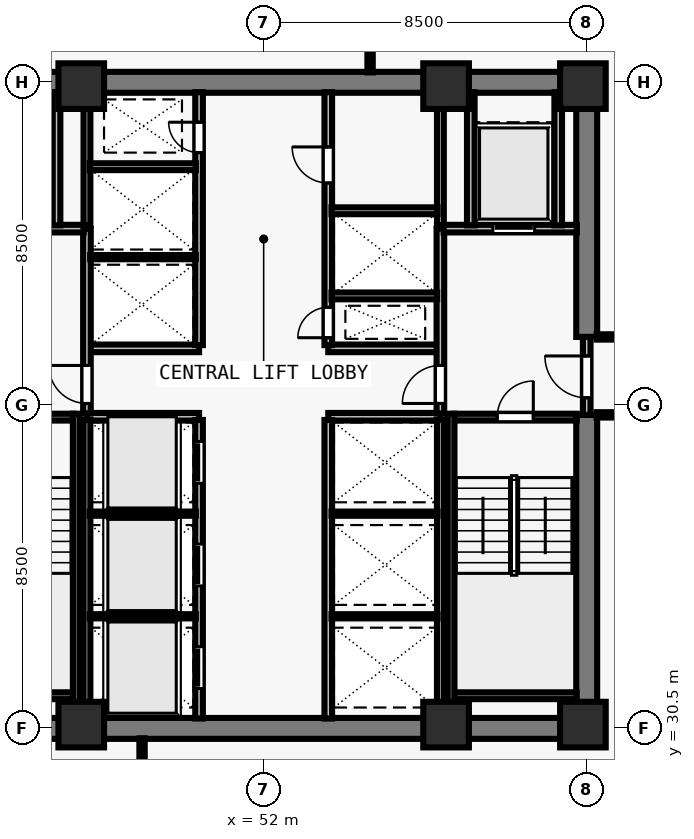
"""IFC4 building model, lengths in metres.
Left out: names, types, materials, properties, quantities, classifications, styles, units other than length and angle.
Written with IfcOpenShell. Run it as: python <this file> out.ifc"""

import sys

from ifc_helpers import new_model, si_unit, direction, frame, frame_2d, origin, origin_2d, place, context, subcontext, project, spatial, rectangle, extrude, element, fill, save


model = new_model("IFC4")
c1 = context("Model", 3, precision=1e-05, world=origin(), true_north=direction((0.0, 1.0)))
c2 = subcontext(c1, "Body", "Model", "MODEL_VIEW")
j1 = project(units=[si_unit("LENGTHUNIT", "METRE"), si_unit("PLANEANGLEUNIT", "RADIAN")], contexts=[c1])
p1 = place(None, origin())
s1 = spatial("IfcSite", under=j1, at=p1, CompositionType="ELEMENT")
p2 = place(p1, origin())
s2 = spatial("IfcBuilding", under=s1, at=p2, CompositionType="ELEMENT")
p3 = place(p2, frame((0.0, 0.0, 62.0)))
s3 = spatial("IfcBuildingStorey", under=s2, at=p3, CompositionType="ELEMENT", Elevation=62.0)
for number, where, z_axis, x_axis in (
    (1, (47.2, 30.6, 0.0), (0.0, 0.0, 1.0), (1.0, 0.0, 0.0)),
    (2, (56.8, 30.6, 0.0), (0.0, 0.0, 1.0), (1.0, 0.0, 0.0)),
    (3, (60.4, 30.6, 0.0), (0.0, 0.0, 1.0), (1.0, 0.0, 0.0)),
    (4, (47.2, 47.4, 0.0), (0.0, 0.0, 1.0), (1.0, 0.0, 0.0)),
    (5, (56.8, 47.4, 0.0), (0.0, 0.0, 1.0), (1.0, 0.0, 0.0)),
    (6, (60.4, 47.4, 0.0), (0.0, 0.0, 1.0), (1.0, 0.0, 0.0)),
):
    element("IfcColumn", number, at=place(p3, frame(where, z_axis=z_axis, x_axis=x_axis)), inside=s3, PredefinedType="COLUMN", context=c2, shape_type="SweptSolid", body=[
        extrude(rectangle(XDim=1.2, YDim=1.2, at=origin_2d()), origin(), (0.0, 0.0, 1.0), 3.5),
    ])
for number, where, z_axis, x_axis in (
    (7, (43.225, 30.5, 0.0), (0.0, 0.0, 1.0), (1.0, 0.0, 0.0)),
    (8, (43.225, 47.5, 0.0), (0.0, 0.0, 1.0), (1.0, 0.0, 0.0)),
):
    element("IfcWall", number, at=place(p3, frame(where, z_axis=z_axis, x_axis=x_axis)), inside=s3, PredefinedType="SHEAR", context=c2, shape_type="SweptSolid", body=[
        extrude(rectangle(XDim=17.55, YDim=0.55, at=frame_2d((8.775, 0.0))), origin(), (0.0, 0.0, 1.0), 3.28),
    ])
p4 = place(p3, frame((60.5, 30.765, 0.0), z_axis=(0.0, 0.0, 1.0), x_axis=(0.0, 1.0, 0.0)))
e9 = element("IfcWall", 9, at=p4, inside=s3, PredefinedType="SHEAR", context=c2, shape_type="SweptSolid", body=[
    extrude(rectangle(XDim=7.985, YDim=0.55, at=frame_2d((3.993, 0.0))), origin(), (0.0, 0.0, 1.0), 3.28),
])
p5 = place(p3, frame((60.5, 40.8, 0.0), z_axis=(0.0, 0.0, 1.0), x_axis=(0.0, 1.0, 0.0)))
e10 = element("IfcWall", 10, at=p5, inside=s3, PredefinedType="SHEAR", context=c2, shape_type="SweptSolid", body=[
    extrude(rectangle(XDim=6.435, YDim=0.55, at=frame_2d((3.218, 0.0))), origin(), (0.0, 0.0, 1.0), 3.28),
])
for number, where, z_axis, x_axis in (
    (11, (47.35, 38.7, 0.0), (0.0, 0.0, 1.0), (1.0, 0.0, 0.0)),
    (12, (47.35, 40.5, 0.0), (0.0, 0.0, 1.0), (1.0, 0.0, 0.0)),
    (13, (53.7, 38.7, 0.0), (0.0, 0.0, 1.0), (1.0, 0.0, 0.0)),
    (14, (53.7, 40.5, 0.0), (0.0, 0.0, 1.0), (1.0, 0.0, 0.0)),
):
    element("IfcWall", number, at=place(p3, frame(where, z_axis=z_axis, x_axis=x_axis)), inside=s3, PredefinedType="SOLIDWALL", context=c2, shape_type="SweptSolid", body=[
        extrude(rectangle(XDim=2.95, YDim=0.2, at=frame_2d((1.475, 0.0))), origin(), (0.0, 0.0, 1.0), 3.28),
    ])
p6 = place(p3, frame((50.3, 30.76, 0.0), z_axis=(0.0, 0.0, 1.0), x_axis=(0.0, 1.0, 0.0)))
e15 = element("IfcWall", 15, at=p6, inside=s3, PredefinedType="SOLIDWALL", context=c2, shape_type="SweptSolid", body=[
    extrude(rectangle(XDim=7.855, YDim=0.2, at=frame_2d((3.927, 0.0))), origin(), (0.0, 0.0, 1.0), 3.28),
])
p7 = place(p6, frame((0.79, 0.0, 0.0)))
e16 = element("IfcOpeningElement", 16, at=p7, cuts=e15, PredefinedType="OPENING", context=c2, shape_type="SweptSolid", body=[
    extrude(rectangle(XDim=1.1, YDim=2.2, at=frame_2d((0.55, 1.1))), frame((0.0, 0.11, 0.0), z_axis=(0.0, -1.0, 0.0), x_axis=(1.0, 0.0, 0.0)), (0.0, 0.0, 1.0), 0.22),
])
p8 = place(p6, frame((3.49, 0.0, 0.0)))
e17 = element("IfcOpeningElement", 17, at=p8, cuts=e15, PredefinedType="OPENING", context=c2, shape_type="SweptSolid", body=[
    extrude(rectangle(XDim=1.1, YDim=2.2, at=frame_2d((0.55, 1.1))), frame((0.0, 0.11, 0.0), z_axis=(0.0, -1.0, 0.0), x_axis=(1.0, 0.0, 0.0)), (0.0, 0.0, 1.0), 0.22),
])
p9 = place(p6, frame((6.19, 0.0, 0.0)))
e18 = element("IfcOpeningElement", 18, at=p9, cuts=e15, PredefinedType="OPENING", context=c2, shape_type="SweptSolid", body=[
    extrude(rectangle(XDim=1.1, YDim=2.2, at=frame_2d((0.55, 1.1))), frame((0.0, 0.11, 0.0), z_axis=(0.0, -1.0, 0.0), x_axis=(1.0, 0.0, 0.0)), (0.0, 0.0, 1.0), 0.22),
])
p10 = place(p3, frame((53.7, 30.76, 0.0), z_axis=(0.0, 0.0, 1.0), x_axis=(0.0, 1.0, 0.0)))
e19 = element("IfcWall", 19, at=p10, inside=s3, PredefinedType="SOLIDWALL", context=c2, shape_type="SweptSolid", body=[
    extrude(rectangle(XDim=7.855, YDim=0.2, at=frame_2d((3.927, 0.0))), origin(), (0.0, 0.0, 1.0), 3.28),
])
p11 = place(p3, frame((50.3, 40.585, 0.0), z_axis=(0.0, 0.0, 1.0), x_axis=(0.0, 1.0, 0.0)))
e20 = element("IfcWall", 20, at=p11, inside=s3, PredefinedType="SOLIDWALL", context=c2, shape_type="SweptSolid", body=[
    extrude(rectangle(XDim=6.655, YDim=0.2, at=frame_2d((3.328, 0.0))), origin(), (0.0, 0.0, 1.0), 3.28),
])
p12 = place(p11, frame((5.065, 0.0, 0.0)))
e21 = element("IfcOpeningElement", 21, at=p12, cuts=e20, PredefinedType="OPENING", context=c2, shape_type="SweptSolid", body=[
    extrude(rectangle(XDim=0.8, YDim=2.08, at=frame_2d((0.4, 1.04))), frame((0.0, 0.11, 0.0), z_axis=(0.0, -1.0, 0.0), x_axis=(1.0, 0.0, 0.0)), (0.0, 0.0, 1.0), 0.22),
])
p13 = place(p3, frame((53.7, 40.585, 0.0), z_axis=(0.0, 0.0, 1.0), x_axis=(0.0, 1.0, 0.0)))
e22 = element("IfcWall", 22, at=p13, inside=s3, PredefinedType="SOLIDWALL", context=c2, shape_type="SweptSolid", body=[
    extrude(rectangle(XDim=6.655, YDim=0.2, at=frame_2d((3.328, 0.0))), origin(), (0.0, 0.0, 1.0), 3.28),
])
p14 = place(p13, frame((0.195, 0.0, 0.0)))
e23 = element("IfcOpeningElement", 23, at=p14, cuts=e22, PredefinedType="OPENING", context=c2, shape_type="SweptSolid", body=[
    extrude(rectangle(XDim=0.8, YDim=2.08, at=frame_2d((0.4, 1.04))), frame((0.0, 0.11, 0.0), z_axis=(0.0, -1.0, 0.0), x_axis=(1.0, 0.0, 0.0)), (0.0, 0.0, 1.0), 0.22),
])
p15 = place(p13, frame((4.265, 0.0, 0.0)))
e24 = element("IfcOpeningElement", 24, at=p15, cuts=e22, PredefinedType="OPENING", context=c2, shape_type="SweptSolid", body=[
    extrude(rectangle(XDim=0.95, YDim=2.12, at=frame_2d((0.475, 1.06))), frame((0.0, 0.11, 0.0), z_axis=(0.0, -1.0, 0.0), x_axis=(1.0, 0.0, 0.0)), (0.0, 0.0, 1.0), 0.22),
])
p16 = place(p3, frame((47.35, 38.785, 0.0), z_axis=(0.0, 0.0, 1.0), x_axis=(0.0, 1.0, 0.0)))
e25 = element("IfcWall", 25, at=p16, inside=s3, PredefinedType="SOLIDWALL", context=c2, shape_type="SweptSolid", body=[
    extrude(rectangle(XDim=4.865, YDim=0.2, at=frame_2d((2.433, 0.0))), origin(), (0.0, 0.0, 1.0), 3.28),
])
p17 = place(p16, frame((0.265, 0.0, 0.0)))
e26 = element("IfcOpeningElement", 26, at=p17, cuts=e25, PredefinedType="OPENING", context=c2, shape_type="SweptSolid", body=[
    extrude(rectangle(XDim=1.0, YDim=2.15, at=frame_2d((0.5, 1.075))), frame((0.0, 0.11, 0.0), z_axis=(0.0, -1.0, 0.0), x_axis=(1.0, 0.0, 0.0)), (0.0, 0.0, 1.0), 0.22),
])
p18 = place(p3, frame((43.76, 43.65, 0.0), z_axis=(0.0, 0.0, 1.0), x_axis=(1.0, 0.0, 0.0)))
e27 = element("IfcWall", 27, at=p18, inside=s3, PredefinedType="SOLIDWALL", context=c2, shape_type="SweptSolid", body=[
    extrude(rectangle(XDim=3.505, YDim=0.2, at=frame_2d((1.752, 0.0))), origin(), (0.0, 0.0, 1.0), 3.28),
])
p19 = place(p18, frame((1.11, 0.0, 0.0)))
e28 = element("IfcOpeningElement", 28, at=p19, cuts=e27, PredefinedType="OPENING", context=c2, shape_type="SweptSolid", body=[
    extrude(rectangle(XDim=1.1, YDim=2.2, at=frame_2d((0.55, 1.1))), frame((0.0, 0.11, 0.0), z_axis=(0.0, -1.0, 0.0), x_axis=(1.0, 0.0, 0.0)), (0.0, 0.0, 1.0), 0.22),
])
p20 = place(p3, frame((46.55, 43.735, 0.0), z_axis=(0.0, 0.0, 1.0), x_axis=(0.0, 1.0, 0.0)))
e29 = element("IfcWall", 29, at=p20, inside=s3, PredefinedType="SOLIDWALL", context=c2, shape_type="SweptSolid", body=[
    extrude(rectangle(XDim=3.505, YDim=0.2, at=frame_2d((1.752, 0.0))), origin(), (0.0, 0.0, 1.0), 3.28),
])
p21 = place(p3, frame((60.5, 38.75, 0.0), z_axis=(0.0, 0.0, 1.0), x_axis=(0.0, 1.0, 0.0)))
e30 = element("IfcWall", 30, at=p21, inside=s3, PredefinedType="SOLIDWALL", context=c2, shape_type="SweptSolid", body=[
    extrude(rectangle(XDim=2.05, YDim=0.2, at=frame_2d((1.025, 0.0))), origin(), (0.0, 0.0, 1.0), 3.28),
])
p22 = place(p21, frame((0.45, 0.0, 0.0)))
e31 = element("IfcOpeningElement", 31, at=p22, cuts=e30, PredefinedType="OPENING", context=c2, shape_type="SweptSolid", body=[
    extrude(rectangle(XDim=1.1, YDim=2.15, at=frame_2d((0.55, 1.075))), frame((0.0, 0.11, 0.0), z_axis=(0.0, -1.0, 0.0), x_axis=(1.0, 0.0, 0.0)), (0.0, 0.0, 1.0), 0.22),
])
p23 = place(p3, frame((56.65, 38.785, 0.0), z_axis=(0.0, 0.0, 1.0), x_axis=(0.0, 1.0, 0.0)))
e32 = element("IfcWall", 32, at=p23, inside=s3, PredefinedType="SOLIDWALL", context=c2, shape_type="SweptSolid", body=[
    extrude(rectangle(XDim=4.865, YDim=0.2, at=frame_2d((2.433, 0.0))), origin(), (0.0, 0.0, 1.0), 3.28),
])
p24 = place(p23, frame((0.265, 0.0, 0.0)))
e33 = element("IfcOpeningElement", 33, at=p24, cuts=e32, PredefinedType="OPENING", context=c2, shape_type="SweptSolid", body=[
    extrude(rectangle(XDim=1.0, YDim=2.15, at=frame_2d((0.5, 1.075))), frame((0.0, 0.11, 0.0), z_axis=(0.0, -1.0, 0.0), x_axis=(1.0, 0.0, 0.0)), (0.0, 0.0, 1.0), 0.22),
])
p25 = place(p3, frame((56.735, 43.65, 0.0), z_axis=(0.0, 0.0, 1.0), x_axis=(1.0, 0.0, 0.0)))
e34 = element("IfcWall", 34, at=p25, inside=s3, PredefinedType="SOLIDWALL", context=c2, shape_type="SweptSolid", body=[
    extrude(rectangle(XDim=3.505, YDim=0.2, at=frame_2d((1.752, 0.0))), origin(), (0.0, 0.0, 1.0), 3.28),
])
p26 = place(p25, frame((1.295, 0.0, 0.0)))
e35 = element("IfcOpeningElement", 35, at=p26, cuts=e34, PredefinedType="OPENING", context=c2, shape_type="SweptSolid", body=[
    extrude(rectangle(XDim=1.1, YDim=2.2, at=frame_2d((0.55, 1.1))), frame((0.0, 0.11, 0.0), z_axis=(0.0, -1.0, 0.0), x_axis=(1.0, 0.0, 0.0)), (0.0, 0.0, 1.0), 0.22),
])
for number, where, z_axis, x_axis in (
    (36, (57.45, 43.735, 0.0), (0.0, 0.0, 1.0), (0.0, 1.0, 0.0)),
    (37, (59.75, 43.735, 0.0), (0.0, 0.0, 1.0), (0.0, 1.0, 0.0)),
):
    element("IfcWall", number, at=place(p3, frame(where, z_axis=z_axis, x_axis=x_axis)), inside=s3, PredefinedType="SOLIDWALL", context=c2, shape_type="SweptSolid", body=[
        extrude(rectangle(XDim=3.505, YDim=0.2, at=frame_2d((1.752, 0.0))), origin(), (0.0, 0.0, 1.0), 3.28),
    ])
p27 = place(p3, frame((47.35, 30.76, 0.0), z_axis=(0.0, 0.0, 1.0), x_axis=(0.0, 1.0, 0.0)))
e38 = element("IfcWall", 38, at=p27, inside=s3, PredefinedType="SOLIDWALL", context=c2, shape_type="SweptSolid", body=[
    extrude(rectangle(XDim=7.855, YDim=0.18, at=frame_2d((3.927, 0.0))), origin(), (0.0, 0.0, 1.0), 3.28),
])
for number, where, z_axis, x_axis in (
    (39, (47.425, 33.45, 0.0), (0.0, 0.0, 1.0), (1.0, 0.0, 0.0)),
    (40, (47.425, 36.15, 0.0), (0.0, 0.0, 1.0), (1.0, 0.0, 0.0)),
):
    element("IfcWall", number, at=place(p3, frame(where, z_axis=z_axis, x_axis=x_axis)), inside=s3, PredefinedType="PARTITIONING", context=c2, shape_type="SweptSolid", body=[
        extrude(rectangle(XDim=2.79, YDim=0.11, at=frame_2d((1.395, 0.0))), origin(), (0.0, 0.0, 1.0), 3.28),
    ])
p28 = place(p3, frame((56.65, 30.76, 0.0), z_axis=(0.0, 0.0, 1.0), x_axis=(0.0, 1.0, 0.0)))
e41 = element("IfcWall", 41, at=p28, inside=s3, PredefinedType="SOLIDWALL", context=c2, shape_type="SweptSolid", body=[
    extrude(rectangle(XDim=7.855, YDim=0.18, at=frame_2d((3.927, 0.0))), origin(), (0.0, 0.0, 1.0), 3.28),
])
for number, where, z_axis, x_axis in (
    (42, (53.785, 33.45, 0.0), (0.0, 0.0, 1.0), (1.0, 0.0, 0.0)),
    (43, (53.785, 36.15, 0.0), (0.0, 0.0, 1.0), (1.0, 0.0, 0.0)),
):
    element("IfcWall", number, at=place(p3, frame(where, z_axis=z_axis, x_axis=x_axis)), inside=s3, PredefinedType="PARTITIONING", context=c2, shape_type="SweptSolid", body=[
        extrude(rectangle(XDim=2.79, YDim=0.11, at=frame_2d((1.395, 0.0))), origin(), (0.0, 0.0, 1.0), 3.28),
    ])
p29 = place(p3, frame((47.35, 43.735, 0.0), z_axis=(0.0, 0.0, 1.0), x_axis=(0.0, 1.0, 0.0)))
e44 = element("IfcWall", 44, at=p29, inside=s3, PredefinedType="SOLIDWALL", context=c2, shape_type="SweptSolid", body=[
    extrude(rectangle(XDim=3.505, YDim=0.18, at=frame_2d((1.752, 0.0))), origin(), (0.0, 0.0, 1.0), 3.28),
])
p30 = place(p3, frame((47.435, 42.9, 0.0), z_axis=(0.0, 0.0, 1.0), x_axis=(1.0, 0.0, 0.0)))
e45 = element("IfcWall", 45, at=p30, inside=s3, PredefinedType="PARTITIONING", context=c2, shape_type="SweptSolid", body=[
    extrude(rectangle(XDim=2.78, YDim=0.11, at=frame_2d((1.39, 0.0))), origin(), (0.0, 0.0, 1.0), 3.28),
])
p31 = place(p3, frame((47.425, 45.28, 0.0), z_axis=(0.0, 0.0, 1.0), x_axis=(1.0, 0.0, 0.0)))
e46 = element("IfcWall", 46, at=p31, inside=s3, PredefinedType="SOLIDWALL", context=c2, shape_type="SweptSolid", body=[
    extrude(rectangle(XDim=2.79, YDim=0.18, at=frame_2d((1.395, 0.0))), origin(), (0.0, 0.0, 1.0), 3.28),
])
p32 = place(p3, frame((56.65, 43.735, 0.0), z_axis=(0.0, 0.0, 1.0), x_axis=(0.0, 1.0, 0.0)))
e47 = element("IfcWall", 47, at=p32, inside=s3, PredefinedType="SOLIDWALL", context=c2, shape_type="SweptSolid", body=[
    extrude(rectangle(XDim=3.505, YDim=0.18, at=frame_2d((1.752, 0.0))), origin(), (0.0, 0.0, 1.0), 3.28),
])
p33 = place(p3, frame((53.785, 41.88, 0.0), z_axis=(0.0, 0.0, 1.0), x_axis=(1.0, 0.0, 0.0)))
e48 = element("IfcWall", 48, at=p33, inside=s3, PredefinedType="SOLIDWALL", context=c2, shape_type="SweptSolid", body=[
    extrude(rectangle(XDim=2.78, YDim=0.18, at=frame_2d((1.39, 0.0))), origin(), (0.0, 0.0, 1.0), 3.28),
])
p34 = place(p3, frame((53.785, 44.12, 0.0), z_axis=(0.0, 0.0, 1.0), x_axis=(1.0, 0.0, 0.0)))
e49 = element("IfcWall", 49, at=p34, inside=s3, PredefinedType="SOLIDWALL", context=c2, shape_type="SweptSolid", body=[
    extrude(rectangle(XDim=2.79, YDim=0.18, at=frame_2d((1.395, 0.0))), origin(), (0.0, 0.0, 1.0), 3.28),
])
for number, where, z_axis, x_axis in (
    (50, (60.76, 38.75, 0.0), (0.0, 0.0, 1.0), (1.0, 0.0, 0.0)),
    (51, (60.76, 40.8, 0.0), (0.0, 0.0, 1.0), (1.0, 0.0, 0.0)),
):
    element("IfcWall", number, at=place(p3, frame(where, z_axis=z_axis, x_axis=x_axis)), inside=s3, PredefinedType="PARTITIONING", context=c2, shape_type="SweptSolid", body=[
        extrude(rectangle(XDim=3.585, YDim=0.14, at=frame_2d((1.792, 0.0))), origin(), (0.0, 0.0, 1.0), 3.28),
    ])
for number, where, z_axis, x_axis in (
    (52, (48.8, 26.505, 0.0), (0.0, 0.0, 1.0), (0.0, 1.0, 0.0)),
    (53, (54.8, 47.76, 0.0), (0.0, 0.0, 1.0), (0.0, 1.0, 0.0)),
):
    element("IfcWall", number, at=place(p3, frame(where, z_axis=z_axis, x_axis=x_axis)), inside=s3, PredefinedType="PARTITIONING", context=c2, shape_type="SweptSolid", body=[
        extrude(rectangle(XDim=3.735, YDim=0.14, at=frame_2d((1.868, 0.0))), origin(), (0.0, 0.0, 1.0), 3.28),
    ])
p35 = place(p3, frame((43.765, 38.69, 0.0), z_axis=(0.0, 0.0, 1.0), x_axis=(1.0, 0.0, 0.0)))
e54 = element("IfcWall", 54, at=p35, inside=s3, PredefinedType="SOLIDWALL", context=c2, shape_type="SweptSolid", body=[
    extrude(rectangle(XDim=3.23, YDim=0.18, at=frame_2d((1.615, 0.0))), origin(), (0.0, 0.0, 1.0), 3.28),
])
p36 = place(p35, frame((1.14, 0.0, 0.0)))
e55 = element("IfcOpeningElement", 55, at=p36, cuts=e54, PredefinedType="OPENING", context=c2, shape_type="SweptSolid", body=[
    extrude(rectangle(XDim=0.95, YDim=2.15, at=frame_2d((0.475, 1.075))), frame((0.0, 0.1, 0.0), z_axis=(0.0, -1.0, 0.0), x_axis=(1.0, 0.0, 0.0)), (0.0, 0.0, 1.0), 0.2),
])
p37 = place(p3, frame((43.765, 31.36, 0.0), z_axis=(0.0, 0.0, 1.0), x_axis=(1.0, 0.0, 0.0)))
e56 = element("IfcWall", 56, at=p37, inside=s3, PredefinedType="SOLIDWALL", context=c2, shape_type="SweptSolid", body=[
    extrude(rectangle(XDim=3.23, YDim=0.18, at=frame_2d((1.615, 0.0))), origin(), (0.0, 0.0, 1.0), 3.28),
])
p38 = place(p3, frame((47.07, 38.78, 0.0), z_axis=(0.0, 0.0, 1.0), x_axis=(0.0, -1.0, 0.0)))
e57 = element("IfcWall", 57, at=p38, inside=s3, PredefinedType="SOLIDWALL", context=c2, shape_type="SweptSolid", body=[
    extrude(rectangle(XDim=8.017, YDim=0.18, at=frame_2d((4.009, 0.0))), origin(), (0.0, 0.0, 1.0), 3.28),
])
p39 = place(p3, frame((57.005, 38.69, 0.0), z_axis=(0.0, 0.0, 1.0), x_axis=(1.0, 0.0, 0.0)))
e58 = element("IfcWall", 58, at=p39, inside=s3, PredefinedType="SOLIDWALL", context=c2, shape_type="SweptSolid", body=[
    extrude(rectangle(XDim=3.23, YDim=0.18, at=frame_2d((1.615, 0.0))), origin(), (0.0, 0.0, 1.0), 3.28),
])
p40 = place(p39, frame((1.14, 0.0, 0.0)))
e59 = element("IfcOpeningElement", 59, at=p40, cuts=e58, PredefinedType="OPENING", context=c2, shape_type="SweptSolid", body=[
    extrude(rectangle(XDim=0.95, YDim=2.15, at=frame_2d((0.475, 1.075))), frame((0.0, 0.1, 0.0), z_axis=(0.0, -1.0, 0.0), x_axis=(1.0, 0.0, 0.0)), (0.0, 0.0, 1.0), 0.2),
])
p41 = place(p3, frame((57.005, 31.36, 0.0), z_axis=(0.0, 0.0, 1.0), x_axis=(1.0, 0.0, 0.0)))
e60 = element("IfcWall", 60, at=p41, inside=s3, PredefinedType="SOLIDWALL", context=c2, shape_type="SweptSolid", body=[
    extrude(rectangle(XDim=3.23, YDim=0.18, at=frame_2d((1.615, 0.0))), origin(), (0.0, 0.0, 1.0), 3.28),
])
p42 = place(p3, frame((56.93, 38.78, 0.0), z_axis=(0.0, 0.0, 1.0), x_axis=(0.0, -1.0, 0.0)))
e61 = element("IfcWall", 61, at=p42, inside=s3, PredefinedType="SOLIDWALL", context=c2, shape_type="SweptSolid", body=[
    extrude(rectangle(XDim=8.017, YDim=0.18, at=frame_2d((4.009, 0.0))), origin(), (0.0, 0.0, 1.0), 3.28),
])
p43 = place(p17, origin())
e62 = element("IfcDoor", 62, at=p43, inside=s3, OperationType="SINGLE_SWING_RIGHT", PredefinedType="DOOR", context=c2, shape_type="SweptSolid", body=[
    extrude(rectangle(XDim=1.0, YDim=2.15, at=frame_2d((0.5, 1.075))), frame((0.0, 0.025, 0.0), z_axis=(0.0, -1.0, 0.0), x_axis=(1.0, 0.0, 0.0)), (0.0, 0.0, 1.0), 0.05),
])
fill(e26, e62)
p44 = place(p22, origin())
e63 = element("IfcDoor", 63, at=p44, inside=s3, OperationType="SINGLE_SWING_RIGHT", PredefinedType="DOOR", context=c2, shape_type="SweptSolid", body=[
    extrude(rectangle(XDim=1.1, YDim=2.15, at=frame_2d((0.55, 1.075))), frame((0.0, 0.025, 0.0), z_axis=(0.0, -1.0, 0.0), x_axis=(1.0, 0.0, 0.0)), (0.0, 0.0, 1.0), 0.05),
])
fill(e31, e63)
p45 = place(p24, origin())
e64 = element("IfcDoor", 64, at=p45, inside=s3, OperationType="SINGLE_SWING_LEFT", PredefinedType="DOOR", context=c2, shape_type="SweptSolid", body=[
    extrude(rectangle(XDim=1.0, YDim=2.15, at=frame_2d((0.5, 1.075))), frame((0.0, 0.025, 0.0), z_axis=(0.0, -1.0, 0.0), x_axis=(1.0, 0.0, 0.0)), (0.0, 0.0, 1.0), 0.05),
])
fill(e33, e64)
p46 = place(p26, origin())
e65 = element("IfcDoor", 65, at=p46, inside=s3, OperationType="SLIDING_TO_LEFT", PredefinedType="DOOR", context=c2, shape_type="SweptSolid", body=[
    extrude(rectangle(XDim=1.1, YDim=2.2, at=frame_2d((0.55, 1.1))), frame((0.0, 0.025, 0.0), z_axis=(0.0, -1.0, 0.0), x_axis=(1.0, 0.0, 0.0)), (0.0, 0.0, 1.0), 0.05),
])
fill(e35, e65)
p47 = place(p7, origin())
e66 = element("IfcDoor", 66, at=p47, inside=s3, OperationType="SLIDING_TO_LEFT", PredefinedType="DOOR", context=c2, shape_type="SweptSolid", body=[
    extrude(rectangle(XDim=1.1, YDim=2.2, at=frame_2d((0.55, 1.1))), frame((0.0, 0.025, 0.0), z_axis=(0.0, -1.0, 0.0), x_axis=(1.0, 0.0, 0.0)), (0.0, 0.0, 1.0), 0.05),
])
fill(e16, e66)
p48 = place(p8, origin())
e67 = element("IfcDoor", 67, at=p48, inside=s3, OperationType="SLIDING_TO_LEFT", PredefinedType="DOOR", context=c2, shape_type="SweptSolid", body=[
    extrude(rectangle(XDim=1.1, YDim=2.2, at=frame_2d((0.55, 1.1))), frame((0.0, 0.025, 0.0), z_axis=(0.0, -1.0, 0.0), x_axis=(1.0, 0.0, 0.0)), (0.0, 0.0, 1.0), 0.05),
])
fill(e17, e67)
p49 = place(p9, origin())
e68 = element("IfcDoor", 68, at=p49, inside=s3, OperationType="SLIDING_TO_LEFT", PredefinedType="DOOR", context=c2, shape_type="SweptSolid", body=[
    extrude(rectangle(XDim=1.1, YDim=2.2, at=frame_2d((0.55, 1.1))), frame((0.0, 0.025, 0.0), z_axis=(0.0, -1.0, 0.0), x_axis=(1.0, 0.0, 0.0)), (0.0, 0.0, 1.0), 0.05),
])
fill(e18, e68)
p50 = place(p12, origin())
e69 = element("IfcDoor", 69, at=p50, inside=s3, OperationType="SINGLE_SWING_RIGHT", PredefinedType="DOOR", context=c2, shape_type="SweptSolid", body=[
    extrude(rectangle(XDim=0.8, YDim=2.08, at=frame_2d((0.4, 1.04))), frame((0.0, 0.025, 0.0), z_axis=(0.0, -1.0, 0.0), x_axis=(1.0, 0.0, 0.0)), (0.0, 0.0, 1.0), 0.05),
])
fill(e21, e69)
p51 = place(p14, origin())
e70 = element("IfcDoor", 70, at=p51, inside=s3, OperationType="SINGLE_SWING_LEFT", PredefinedType="DOOR", context=c2, shape_type="SweptSolid", body=[
    extrude(rectangle(XDim=0.8, YDim=2.08, at=frame_2d((0.4, 1.04))), frame((0.0, 0.025, 0.0), z_axis=(0.0, -1.0, 0.0), x_axis=(1.0, 0.0, 0.0)), (0.0, 0.0, 1.0), 0.05),
])
fill(e23, e70)
p52 = place(p15, origin())
e71 = element("IfcDoor", 71, at=p52, inside=s3, OperationType="SINGLE_SWING_RIGHT", PredefinedType="DOOR", context=c2, shape_type="SweptSolid", body=[
    extrude(rectangle(XDim=0.95, YDim=2.12, at=frame_2d((0.475, 1.06))), frame((0.0, 0.025, 0.0), z_axis=(0.0, -1.0, 0.0), x_axis=(1.0, 0.0, 0.0)), (0.0, 0.0, 1.0), 0.05),
])
fill(e24, e71)
p53 = place(p40, origin())
e72 = element("IfcDoor", 72, at=p53, inside=s3, OperationType="SINGLE_SWING_RIGHT", PredefinedType="DOOR", context=c2, shape_type="SweptSolid", body=[
    extrude(rectangle(XDim=0.95, YDim=2.15, at=frame_2d((0.475, 1.075))), frame((0.0, 0.025, 0.0), z_axis=(0.0, -1.0, 0.0), x_axis=(1.0, 0.0, 0.0)), (0.0, 0.0, 1.0), 0.05),
])
fill(e59, e72)
save(model, sys.argv[1])
